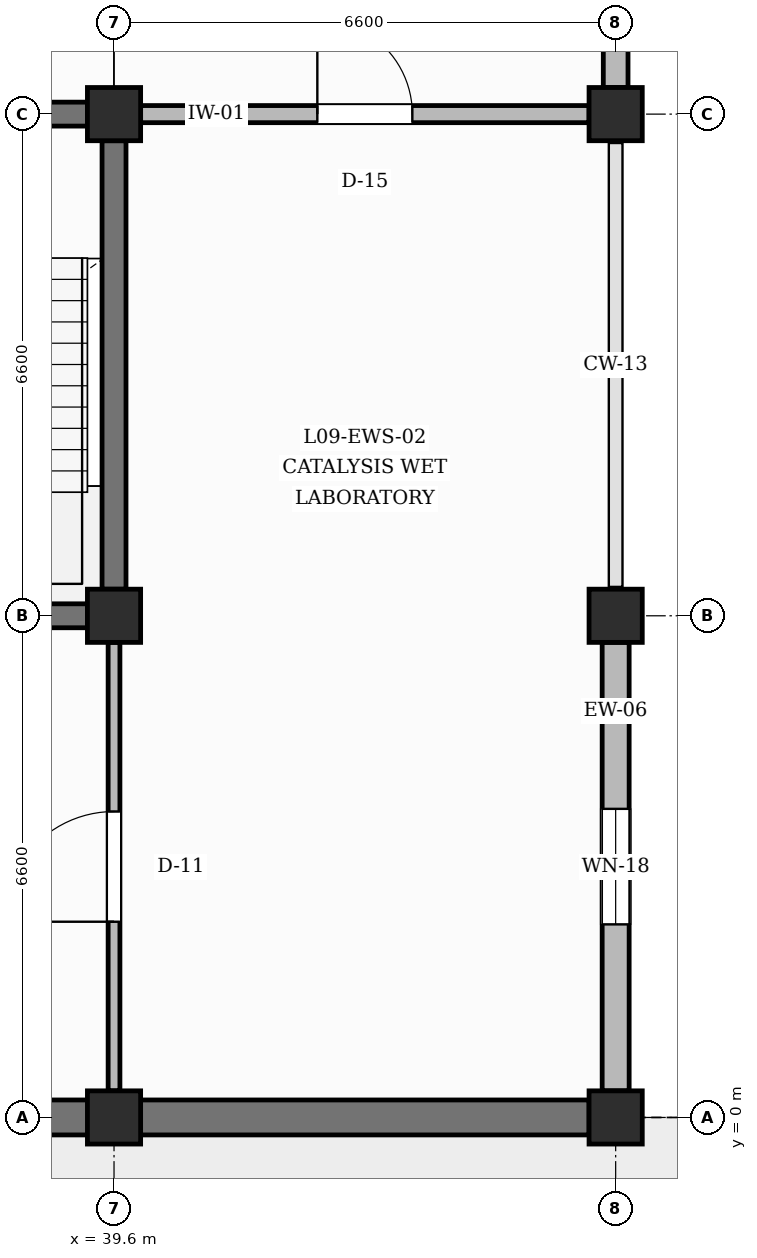
"""IFC4 building model, lengths in metres.
Left out: names, types, materials, properties, quantities, classifications, styles, units other than length and angle.
Written with IfcOpenShell. Run it as: python <this file> out.ifc"""

import sys

from ifc_helpers import new_model, si_unit, direction, frame, frame_2d, origin, origin_2d, place, context, subcontext, project, spatial, rectangle, extrude, element, fill, save


model = new_model("IFC4")
c1 = context("Model", 3, precision=1e-05, world=origin(), true_north=direction((0.0, 1.0)))
c2 = subcontext(c1, "Body", "Model", "MODEL_VIEW")
j1 = project(units=[si_unit("LENGTHUNIT", "METRE"), si_unit("PLANEANGLEUNIT", "RADIAN")], contexts=[c1])
p1 = place(None, origin())
s1 = spatial("IfcSite", under=j1, at=p1, CompositionType="ELEMENT")
p2 = place(p1, origin())
s2 = spatial("IfcBuilding", under=s1, at=p2, CompositionType="ELEMENT")
p3 = place(p2, frame((0.0, 0.0, 39.6)))
s3 = spatial("IfcBuildingStorey", under=s2, at=p3, CompositionType="ELEMENT", Elevation=39.6)
for number, where, z_axis, x_axis in (
    (1, (39.6, 0.0, 0.0), (0.0, 0.0, 1.0), (1.0, 0.0, 0.0)),
    (2, (39.6, 6.6, 0.0), (0.0, 0.0, 1.0), (1.0, 0.0, 0.0)),
    (3, (39.6, 13.2, 0.0), (0.0, 0.0, 1.0), (1.0, 0.0, 0.0)),
    (4, (46.2, 0.0, 0.0), (0.0, 0.0, 1.0), (1.0, 0.0, 0.0)),
    (5, (46.2, 6.6, 0.0), (0.0, 0.0, 1.0), (1.0, 0.0, 0.0)),
    (6, (46.2, 13.2, 0.0), (0.0, 0.0, 1.0), (1.0, 0.0, 0.0)),
):
    element("IfcColumn", number, at=place(p3, frame(where, z_axis=z_axis, x_axis=x_axis)), inside=s3, PredefinedType="COLUMN", context=c2, shape_type="SweptSolid", body=[
        extrude(rectangle(XDim=0.7, YDim=0.7, at=origin_2d()), origin(), (0.0, 0.0, 1.0), 4.2),
    ])
p4 = place(p3, frame((33.35, 0.0, 0.0), z_axis=(0.0, 0.0, 1.0), x_axis=(1.0, 0.0, 0.0)))
e7 = element("IfcWall", 7, at=p4, inside=s3, PredefinedType="SOLIDWALL", context=c2, shape_type="SweptSolid", body=[
    extrude(rectangle(XDim=5.9, YDim=0.46, at=frame_2d((2.95, 0.0))), origin(), (0.0, 0.0, 1.0), 3.29),
])
p5 = place(p3, frame((39.95, 0.0, 0.0), z_axis=(0.0, 0.0, 1.0), x_axis=(1.0, 0.0, 0.0)))
e8 = element("IfcWall", 8, at=p5, inside=s3, PredefinedType="SOLIDWALL", context=c2, shape_type="SweptSolid", body=[
    extrude(rectangle(XDim=5.9, YDim=0.46, at=frame_2d((2.95, 0.0))), origin(), (0.0, 0.0, 1.0), 3.29),
])
p6 = place(p3, frame((46.2, 0.35, 0.0), z_axis=(0.0, 0.0, 1.0), x_axis=(0.0, 1.0, 0.0)))
e9 = element("IfcWall", 9, at=p6, inside=s3, PredefinedType="SOLIDWALL", context=c2, shape_type="SweptSolid", body=[
    extrude(rectangle(XDim=5.9, YDim=0.355, at=frame_2d((2.95, 0.0))), origin(), (0.0, 0.0, 1.0), 3.29),
])
p7 = place(p6, frame((2.19, 0.0, 0.95)))
e10 = element("IfcOpeningElement", 10, at=p7, cuts=e9, PredefinedType="OPENING", context=c2, shape_type="SweptSolid", body=[
    extrude(rectangle(XDim=1.52, YDim=1.52, at=frame_2d((0.76, 0.76))), frame((0.0, 0.188, 0.0), z_axis=(0.0, -1.0, 0.0), x_axis=(1.0, 0.0, 0.0)), (0.0, 0.0, 1.0), 0.375),
])
p8 = place(p3, frame((46.2, 13.55, 0.0), z_axis=(0.0, 0.0, 1.0), x_axis=(0.0, 1.0, 0.0)))
e11 = element("IfcWall", 11, at=p8, inside=s3, PredefinedType="SOLIDWALL", context=c2, shape_type="SweptSolid", body=[
    extrude(rectangle(XDim=5.9, YDim=0.325, at=frame_2d((2.95, 0.0))), origin(), (0.0, 0.0, 1.0), 3.29),
])
p9 = place(p8, frame((2.19, 0.0, 0.95)))
e12 = element("IfcOpeningElement", 12, at=p9, cuts=e11, PredefinedType="OPENING", context=c2, shape_type="SweptSolid", body=[
    extrude(rectangle(XDim=1.52, YDim=1.74, at=frame_2d((0.76, 0.87))), frame((0.0, 0.172, 0.0), z_axis=(0.0, -1.0, 0.0), x_axis=(1.0, 0.0, 0.0)), (0.0, 0.0, 1.0), 0.345),
])
p10 = place(p3, frame((33.35, 6.6, 0.0), z_axis=(0.0, 0.0, 1.0), x_axis=(1.0, 0.0, 0.0)))
e13 = element("IfcWall", 13, at=p10, inside=s3, PredefinedType="SHEAR", context=c2, shape_type="SweptSolid", body=[
    extrude(rectangle(XDim=5.9, YDim=0.315, at=frame_2d((2.95, 0.0))), origin(), (0.0, 0.0, 1.0), 3.29),
])
p11 = place(p3, frame((33.35, 13.2, 0.0), z_axis=(0.0, 0.0, 1.0), x_axis=(1.0, 0.0, 0.0)))
e14 = element("IfcWall", 14, at=p11, inside=s3, PredefinedType="SHEAR", context=c2, shape_type="SweptSolid", body=[
    extrude(rectangle(XDim=5.9, YDim=0.315, at=frame_2d((2.95, 0.0))), origin(), (0.0, 0.0, 1.0), 3.29),
])
p12 = place(p11, frame((2.4, 0.0, 0.0)))
e15 = element("IfcOpeningElement", 15, at=p12, cuts=e14, PredefinedType="OPENING", context=c2, shape_type="SweptSolid", body=[
    extrude(rectangle(XDim=1.1, YDim=2.15, at=frame_2d((0.55, 1.075))), frame((0.0, 0.167, 0.0), z_axis=(0.0, -1.0, 0.0), x_axis=(1.0, 0.0, 0.0)), (0.0, 0.0, 1.0), 0.335),
])
p13 = place(p3, frame((39.6, 6.95, 0.0), z_axis=(0.0, 0.0, 1.0), x_axis=(0.0, 1.0, 0.0)))
e16 = element("IfcWall", 16, at=p13, inside=s3, PredefinedType="SHEAR", context=c2, shape_type="SweptSolid", body=[
    extrude(rectangle(XDim=5.9, YDim=0.315, at=frame_2d((2.95, 0.0))), origin(), (0.0, 0.0, 1.0), 3.29),
])
p14 = place(p3, frame((39.6, 0.35, 0.0), z_axis=(0.0, 0.0, 1.0), x_axis=(0.0, 1.0, 0.0)))
e17 = element("IfcWall", 17, at=p14, inside=s3, PredefinedType="PARTITIONING", context=c2, shape_type="SweptSolid", body=[
    extrude(rectangle(XDim=5.9, YDim=0.155, at=frame_2d((2.95, 0.0))), origin(), (0.0, 0.0, 1.0), 3.29),
])
p15 = place(p14, frame((2.225, 0.0, 0.0)))
e18 = element("IfcOpeningElement", 18, at=p15, cuts=e17, PredefinedType="OPENING", context=c2, shape_type="SweptSolid", body=[
    extrude(rectangle(XDim=1.45, YDim=2.25, at=frame_2d((0.725, 1.125))), frame((0.0, 0.087, 0.0), z_axis=(0.0, -1.0, 0.0), x_axis=(1.0, 0.0, 0.0)), (0.0, 0.0, 1.0), 0.175),
])
p16 = place(p3, frame((39.95, 13.2, 0.0), z_axis=(0.0, 0.0, 1.0), x_axis=(1.0, 0.0, 0.0)))
e19 = element("IfcWall", 19, at=p16, inside=s3, PredefinedType="PARTITIONING", context=c2, shape_type="SweptSolid", body=[
    extrude(rectangle(XDim=5.9, YDim=0.225, at=frame_2d((2.95, 0.0))), origin(), (0.0, 0.0, 1.0), 3.29),
])
p17 = place(p16, frame((2.325, 0.0, 0.0)))
e20 = element("IfcOpeningElement", 20, at=p17, cuts=e19, PredefinedType="OPENING", context=c2, shape_type="SweptSolid", body=[
    extrude(rectangle(XDim=1.25, YDim=2.25, at=frame_2d((0.625, 1.125))), frame((0.0, 0.123, 0.0), z_axis=(0.0, -1.0, 0.0), x_axis=(1.0, 0.0, 0.0)), (0.0, 0.0, 1.0), 0.245),
])
p18 = place(p7, origin())
e21 = element("IfcWindow", 21, at=p18, inside=s3, PartitioningType="DOUBLE_PANEL_VERTICAL", PredefinedType="WINDOW", context=c2, shape_type="SweptSolid", body=[
    extrude(rectangle(XDim=1.52, YDim=1.52, at=frame_2d((0.76, 0.76))), frame((0.0, 0.03, 0.0), z_axis=(0.0, -1.0, 0.0), x_axis=(1.0, 0.0, 0.0)), (0.0, 0.0, 1.0), 0.06),
])
fill(e10, e21)
p19 = place(p17, origin())
e22 = element("IfcDoor", 22, at=p19, inside=s3, OperationType="SINGLE_SWING_LEFT", PredefinedType="DOOR", context=c2, shape_type="SweptSolid", body=[
    extrude(rectangle(XDim=1.25, YDim=2.25, at=frame_2d((0.625, 1.125))), frame((0.0, 0.025, 0.0), z_axis=(0.0, -1.0, 0.0), x_axis=(1.0, 0.0, 0.0)), (0.0, 0.0, 1.0), 0.05),
])
fill(e20, e22)
p20 = place(p15, origin())
e23 = element("IfcDoor", 23, at=p20, inside=s3, OperationType="SINGLE_SWING_LEFT", PredefinedType="DOOR", context=c2, shape_type="SweptSolid", body=[
    extrude(rectangle(XDim=1.45, YDim=2.25, at=frame_2d((0.725, 1.125))), frame((0.0, 0.025, 0.0), z_axis=(0.0, -1.0, 0.0), x_axis=(1.0, 0.0, 0.0)), (0.0, 0.0, 1.0), 0.05),
])
fill(e18, e23)
save(model, sys.argv[1])
